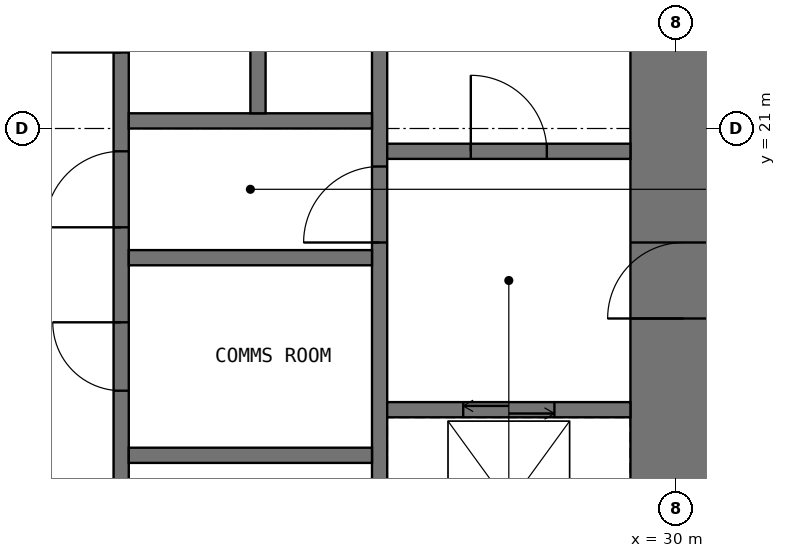
"""IFC4 building model, lengths in metres.
Left out: names, types, materials, properties, quantities, classifications, styles, units other than length and angle.
Written with IfcOpenShell. Run it as: python <this file> out.ifc"""

import sys

from ifc_helpers import new_model, si_unit, direction, frame, frame_2d, origin, place, context, subcontext, project, spatial, rectangle, extrude, element, fill, save


model = new_model("IFC4")
c1 = context("Model", 3, precision=1e-05, world=origin(), true_north=direction((0.0, 1.0)))
c2 = subcontext(c1, "Body", "Model", "MODEL_VIEW")
j1 = project(units=[si_unit("LENGTHUNIT", "METRE"), si_unit("PLANEANGLEUNIT", "RADIAN")], contexts=[c1])
p1 = place(None, origin())
s1 = spatial("IfcSite", under=j1, at=p1, CompositionType="ELEMENT")
p2 = place(p1, origin())
s2 = spatial("IfcBuilding", under=s1, at=p2, CompositionType="ELEMENT")
p3 = place(p2, frame((0.0, 0.0, 198.5)))
s3 = spatial("IfcBuildingStorey", under=s2, at=p3, CompositionType="ELEMENT", Elevation=198.5)
p4 = place(p3, frame((30.1, 12.6, -0.05), z_axis=(0.0, 0.0, 1.0), x_axis=(0.0, 1.0, 0.0)))
e1 = element("IfcWall", 1, at=p4, inside=s3, PredefinedType="SHEAR", context=c2, shape_type="SweptSolid", body=[
    extrude(rectangle(XDim=16.8, YDim=1.4, at=frame_2d((8.4, 0.0))), origin(), (0.0, 0.0, 1.0), 4.0),
])
p5 = place(p4, frame((5.9, 0.0, 0.05)))
e2 = element("IfcOpeningElement", 2, at=p5, cuts=e1, PredefinedType="OPENING", context=c2, shape_type="SweptSolid", body=[
    extrude(rectangle(XDim=1.0, YDim=2.2, at=frame_2d((0.5, 1.1))), frame((0.0, 0.71, 0.0), z_axis=(0.0, -1.0, 0.0), x_axis=(1.0, 0.0, 0.0)), (0.0, 0.0, 1.0), 1.42),
])
p6 = place(p3, frame((22.7, 12.6, -0.05), z_axis=(0.0, 0.0, 1.0), x_axis=(0.0, 1.0, 0.0)))
e3 = element("IfcWall", 3, at=p6, inside=s3, PredefinedType="SHEAR", context=c2, shape_type="SweptSolid", body=[
    extrude(rectangle(XDim=16.8, YDim=0.2, at=frame_2d((8.4, 0.0))), origin(), (0.0, 0.0, 1.0), 4.0),
])
p7 = place(p6, frame((0.45, 0.0, 0.05)))
e4 = element("IfcOpeningElement", 4, at=p7, cuts=e3, PredefinedType="OPENING", context=c2, shape_type="SweptSolid", body=[
    extrude(rectangle(XDim=0.9, YDim=2.2, at=frame_2d((0.45, 1.1))), frame((0.0, 0.11, 0.0), z_axis=(0.0, -1.0, 0.0), x_axis=(1.0, 0.0, 0.0)), (0.0, 0.0, 1.0), 0.22),
])
p8 = place(p6, frame((7.1, 0.0, 0.05)))
e5 = element("IfcOpeningElement", 5, at=p8, cuts=e3, PredefinedType="OPENING", context=c2, shape_type="SweptSolid", body=[
    extrude(rectangle(XDim=1.0, YDim=2.2, at=frame_2d((0.5, 1.1))), frame((0.0, 0.11, 0.0), z_axis=(0.0, -1.0, 0.0), x_axis=(1.0, 0.0, 0.0)), (0.0, 0.0, 1.0), 0.22),
])
p9 = place(p6, frame((1.95, 0.0, 0.05)))
e6 = element("IfcOpeningElement", 6, at=p9, cuts=e3, PredefinedType="OPENING", context=c2, shape_type="SweptSolid", body=[
    extrude(rectangle(XDim=0.9, YDim=2.2, at=frame_2d((0.45, 1.1))), frame((0.0, 0.11, 0.0), z_axis=(0.0, -1.0, 0.0), x_axis=(1.0, 0.0, 0.0)), (0.0, 0.0, 1.0), 0.22),
])
p10 = place(p6, frame((4.95, 0.0, 0.05)))
e7 = element("IfcOpeningElement", 7, at=p10, cuts=e3, PredefinedType="OPENING", context=c2, shape_type="SweptSolid", body=[
    extrude(rectangle(XDim=0.9, YDim=2.2, at=frame_2d((0.45, 1.1))), frame((0.0, 0.11, 0.0), z_axis=(0.0, -1.0, 0.0), x_axis=(1.0, 0.0, 0.0)), (0.0, 0.0, 1.0), 0.22),
])
p11 = place(p6, frame((9.4, 0.0, 0.05)))
e8 = element("IfcOpeningElement", 8, at=p11, cuts=e3, PredefinedType="OPENING", context=c2, shape_type="SweptSolid", body=[
    extrude(rectangle(XDim=1.0, YDim=2.2, at=frame_2d((0.5, 1.1))), frame((0.0, 0.11, 0.0), z_axis=(0.0, -1.0, 0.0), x_axis=(1.0, 0.0, 0.0)), (0.0, 0.0, 1.0), 0.22),
])
p12 = place(p6, frame((12.2, 0.0, 0.05)))
e9 = element("IfcOpeningElement", 9, at=p12, cuts=e3, PredefinedType="OPENING", context=c2, shape_type="SweptSolid", body=[
    extrude(rectangle(XDim=1.0, YDim=2.2, at=frame_2d((0.5, 1.1))), frame((0.0, 0.11, 0.0), z_axis=(0.0, -1.0, 0.0), x_axis=(1.0, 0.0, 0.0)), (0.0, 0.0, 1.0), 0.22),
])
p13 = place(p3, frame((26.1, 12.6, -0.05), z_axis=(0.0, 0.0, 1.0), x_axis=(0.0, 1.0, 0.0)))
e10 = element("IfcWall", 10, at=p13, inside=s3, PredefinedType="SHEAR", context=c2, shape_type="SweptSolid", body=[
    extrude(rectangle(XDim=16.8, YDim=0.2, at=frame_2d((8.4, 0.0))), origin(), (0.0, 0.0, 1.0), 4.0),
])
p14 = place(p13, frame((6.9, 0.0, 0.05)))
e11 = element("IfcOpeningElement", 11, at=p14, cuts=e10, PredefinedType="OPENING", context=c2, shape_type="SweptSolid", body=[
    extrude(rectangle(XDim=1.0, YDim=2.2, at=frame_2d((0.5, 1.1))), frame((0.0, 0.11, 0.0), z_axis=(0.0, -1.0, 0.0), x_axis=(1.0, 0.0, 0.0)), (0.0, 0.0, 1.0), 0.22),
])
for number, where, z_axis, x_axis in (
    (12, (22.8, 16.7, -0.05), (0.0, 0.0, 1.0), (1.0, 0.0, 0.0)),
    (13, (22.8, 19.3, -0.05), (0.0, 0.0, 1.0), (1.0, 0.0, 0.0)),
    (14, (22.8, 21.1, -0.05), (0.0, 0.0, 1.0), (1.0, 0.0, 0.0)),
):
    element("IfcWall", number, at=place(p3, frame(where, z_axis=z_axis, x_axis=x_axis)), inside=s3, PredefinedType="SHEAR", context=c2, shape_type="SweptSolid", body=[
        extrude(rectangle(XDim=3.2, YDim=0.2, at=frame_2d((1.6, 0.0))), origin(), (0.0, 0.0, 1.0), 4.0),
    ])
p15 = place(p3, frame((26.2, 17.3, -0.05), z_axis=(0.0, 0.0, 1.0), x_axis=(1.0, 0.0, 0.0)))
e15 = element("IfcWall", 15, at=p15, inside=s3, PredefinedType="SHEAR", context=c2, shape_type="SweptSolid", body=[
    extrude(rectangle(XDim=3.2, YDim=0.2, at=frame_2d((1.6, 0.0))), origin(), (0.0, 0.0, 1.0), 4.0),
])
p16 = place(p15, frame((1.0, 0.0, 0.05)))
e16 = element("IfcOpeningElement", 16, at=p16, cuts=e15, PredefinedType="OPENING", context=c2, shape_type="SweptSolid", body=[
    extrude(rectangle(XDim=1.2, YDim=2.2, at=frame_2d((0.6, 1.1))), frame((0.0, 0.11, 0.0), z_axis=(0.0, -1.0, 0.0), x_axis=(1.0, 0.0, 0.0)), (0.0, 0.0, 1.0), 0.22),
])
p17 = place(p3, frame((26.2, 20.7, -0.05), z_axis=(0.0, 0.0, 1.0), x_axis=(1.0, 0.0, 0.0)))
e17 = element("IfcWall", 17, at=p17, inside=s3, PredefinedType="SHEAR", context=c2, shape_type="SweptSolid", body=[
    extrude(rectangle(XDim=3.2, YDim=0.2, at=frame_2d((1.6, 0.0))), origin(), (0.0, 0.0, 1.0), 4.0),
])
p18 = place(p17, frame((1.1, 0.0, 0.05)))
e18 = element("IfcOpeningElement", 18, at=p18, cuts=e17, PredefinedType="OPENING", context=c2, shape_type="SweptSolid", body=[
    extrude(rectangle(XDim=1.0, YDim=2.2, at=frame_2d((0.5, 1.1))), frame((0.0, 0.11, 0.0), z_axis=(0.0, -1.0, 0.0), x_axis=(1.0, 0.0, 0.0)), (0.0, 0.0, 1.0), 0.22),
])
p19 = place(p3, frame((24.5, 21.2, -0.05), z_axis=(0.0, 0.0, 1.0), x_axis=(0.0, 1.0, 0.0)))
e19 = element("IfcWall", 19, at=p19, inside=s3, PredefinedType="SHEAR", context=c2, shape_type="SweptSolid", body=[
    extrude(rectangle(XDim=2.6, YDim=0.2, at=frame_2d((1.3, 0.0))), origin(), (0.0, 0.0, 1.0), 4.0),
])
p20 = place(p19, frame((0.85, 0.0, 0.05)))
e20 = element("IfcOpeningElement", 20, at=p20, cuts=e19, PredefinedType="OPENING", context=c2, shape_type="SweptSolid", body=[
    extrude(rectangle(XDim=0.9, YDim=2.2, at=frame_2d((0.45, 1.1))), frame((0.0, 0.11, 0.0), z_axis=(0.0, -1.0, 0.0), x_axis=(1.0, 0.0, 0.0)), (0.0, 0.0, 1.0), 0.22),
])
p21 = place(p5, origin())
e21 = element("IfcDoor", 21, at=p21, inside=s3, OperationType="SINGLE_SWING_LEFT", PredefinedType="DOOR", context=c2, shape_type="SweptSolid", body=[
    extrude(rectangle(XDim=1.0, YDim=2.2, at=frame_2d((0.5, 1.1))), frame((0.0, 0.025, 0.0), z_axis=(0.0, -1.0, 0.0), x_axis=(1.0, 0.0, 0.0)), (0.0, 0.0, 1.0), 0.05),
])
fill(e2, e21)
p22 = place(p18, origin())
e22 = element("IfcDoor", 22, at=p22, inside=s3, OperationType="SINGLE_SWING_LEFT", PredefinedType="DOOR", context=c2, shape_type="SweptSolid", body=[
    extrude(rectangle(XDim=1.0, YDim=2.2, at=frame_2d((0.5, 1.1))), frame((0.0, 0.025, 0.0), z_axis=(0.0, -1.0, 0.0), x_axis=(1.0, 0.0, 0.0)), (0.0, 0.0, 1.0), 0.05),
])
fill(e18, e22)
p23 = place(p14, origin())
e23 = element("IfcDoor", 23, at=p23, inside=s3, OperationType="SINGLE_SWING_LEFT", PredefinedType="DOOR", context=c2, shape_type="SweptSolid", body=[
    extrude(rectangle(XDim=1.0, YDim=2.2, at=frame_2d((0.5, 1.1))), frame((0.0, 0.025, 0.0), z_axis=(0.0, -1.0, 0.0), x_axis=(1.0, 0.0, 0.0)), (0.0, 0.0, 1.0), 0.05),
])
fill(e11, e23)
p24 = place(p8, origin())
e24 = element("IfcDoor", 24, at=p24, inside=s3, OperationType="SINGLE_SWING_LEFT", PredefinedType="DOOR", context=c2, shape_type="SweptSolid", body=[
    extrude(rectangle(XDim=1.0, YDim=2.2, at=frame_2d((0.5, 1.1))), frame((0.0, 0.025, 0.0), z_axis=(0.0, -1.0, 0.0), x_axis=(1.0, 0.0, 0.0)), (0.0, 0.0, 1.0), 0.05),
])
fill(e5, e24)
p25 = place(p10, origin())
e25 = element("IfcDoor", 25, at=p25, inside=s3, OperationType="SINGLE_SWING_RIGHT", PredefinedType="DOOR", context=c2, shape_type="SweptSolid", body=[
    extrude(rectangle(XDim=0.9, YDim=2.2, at=frame_2d((0.45, 1.1))), frame((0.0, 0.025, 0.0), z_axis=(0.0, -1.0, 0.0), x_axis=(1.0, 0.0, 0.0)), (0.0, 0.0, 1.0), 0.05),
])
fill(e7, e25)
p26 = place(p16, origin())
e26 = element("IfcDoor", 26, at=p26, inside=s3, OperationType="DOUBLE_DOOR_SLIDING", PredefinedType="DOOR", context=c2, shape_type="SweptSolid", body=[
    extrude(rectangle(XDim=1.2, YDim=2.2, at=frame_2d((0.6, 1.1))), frame((0.0, 0.025, 0.0), z_axis=(0.0, -1.0, 0.0), x_axis=(1.0, 0.0, 0.0)), (0.0, 0.0, 1.0), 0.05),
])
fill(e16, e26)
save(model, sys.argv[1])
